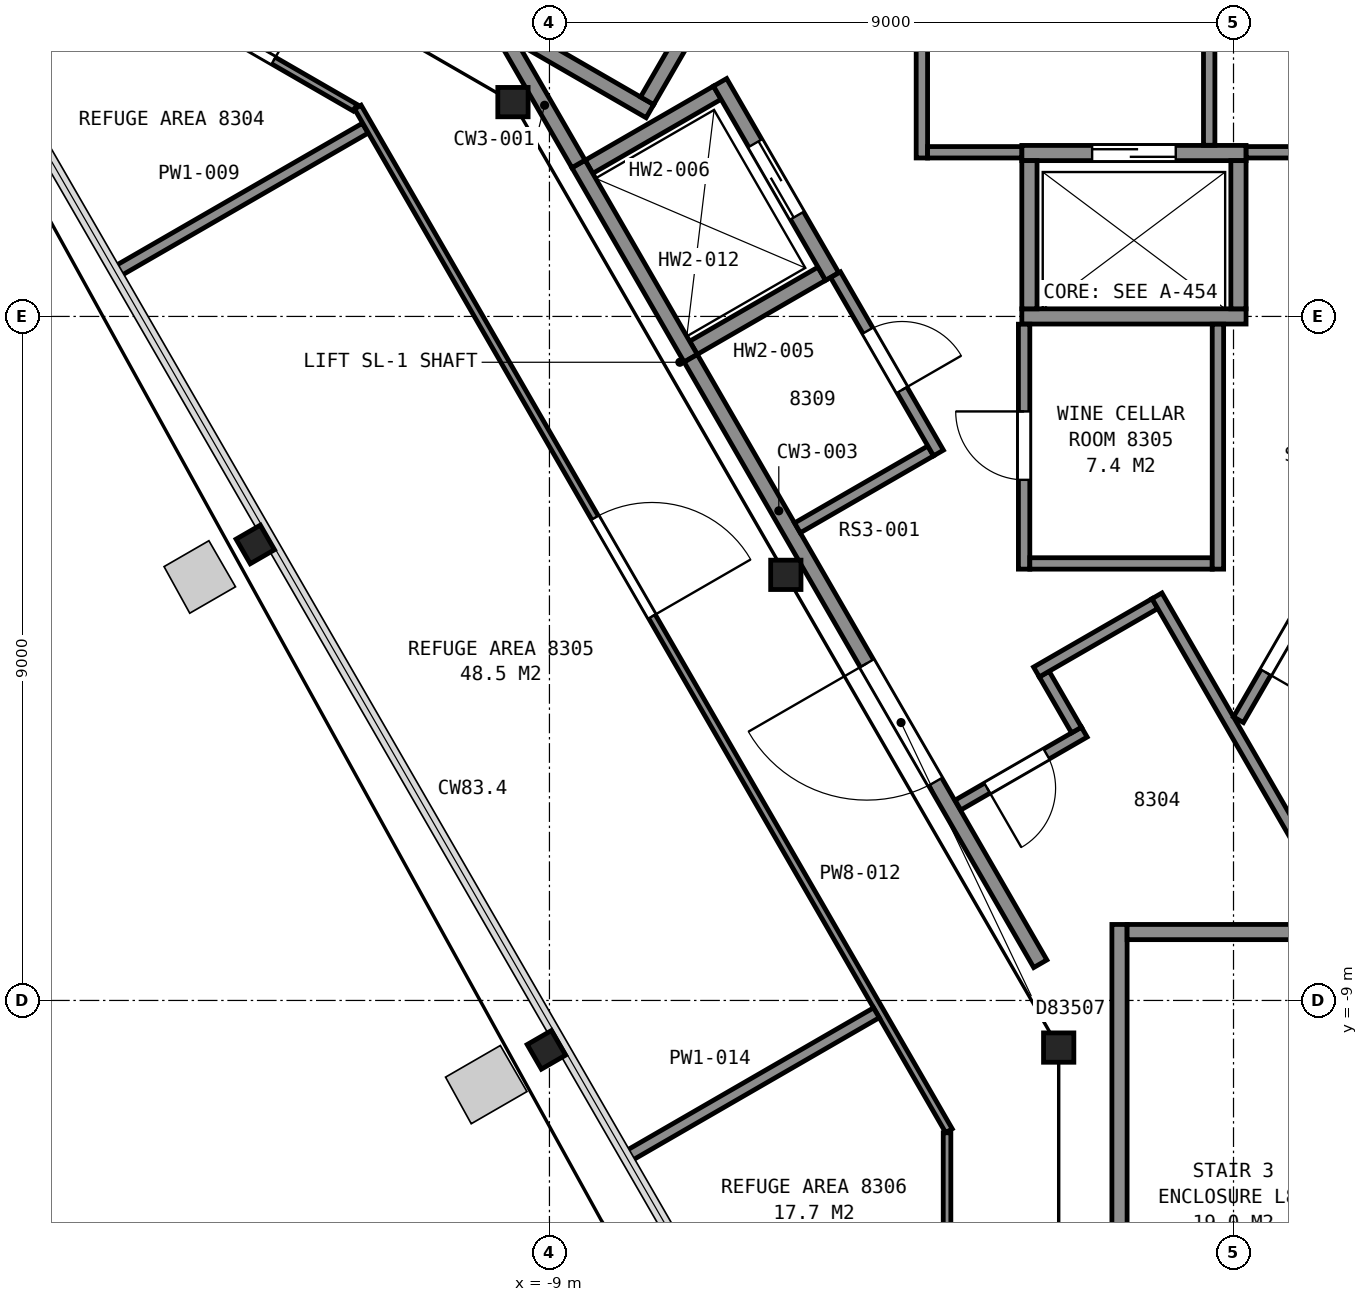
"""IFC4 building model, lengths in metres.
Left out: names, types, materials, properties, quantities, classifications, styles, units other than length and angle.
Written with IfcOpenShell. Run it as: python <this file> out.ifc"""

import sys

from ifc_helpers import new_model, si_unit, direction, frame, frame_2d, origin, origin_2d, place, context, subcontext, project, spatial, rectangle, i_section, extrude, element, fill, save


model = new_model("IFC4")
c1 = context("Model", 3, precision=1e-05, world=origin(), true_north=direction((0.0, 1.0)))
c2 = subcontext(c1, "Body", "Model", "MODEL_VIEW")
j1 = project(units=[si_unit("LENGTHUNIT", "METRE"), si_unit("PLANEANGLEUNIT", "RADIAN")], contexts=[c1])
p1 = place(None, origin())
s1 = spatial("IfcSite", under=j1, at=p1, CompositionType="ELEMENT")
p2 = place(p1, origin())
s2 = spatial("IfcBuilding", under=s1, at=p2, CompositionType="ELEMENT")
p3 = place(p2, frame((0.0, 0.0, 329.4)))
s3 = spatial("IfcBuildingStorey", under=s2, at=p3, CompositionType="ELEMENT", Elevation=329.4)
p4 = place(p3, frame((-12.87, -3.0, 0.0), z_axis=(0.0, 0.0, 1.0), x_axis=(-0.5, 0.866025403784, 0.0)))
e1 = element("IfcColumn", 1, at=p4, inside=s3, PredefinedType="COLUMN", context=c2, shape_type="SweptSolid", body=[
    extrude(i_section(OverallWidth=0.373, OverallDepth=0.368, WebThickness=0.015, FlangeThickness=0.024, FilletRadius=0.015, at=origin_2d()), origin(), (0.0, 0.0, 1.0), 4.37),
])
p5 = place(p3, frame((-9.04, -9.65, 0.0), z_axis=(0.0, 0.0, 1.0), x_axis=(-0.5, 0.866025403784, 0.0)))
e2 = element("IfcColumn", 2, at=p5, inside=s3, PredefinedType="COLUMN", context=c2, shape_type="SweptSolid", body=[
    extrude(i_section(OverallWidth=0.373, OverallDepth=0.368, WebThickness=0.015, FlangeThickness=0.024, FilletRadius=0.015, at=origin_2d()), origin(), (0.0, 0.0, 1.0), 4.59),
])
for number, where, z_axis, x_axis in (
    (3, (-9.48, 2.82, 0.0), (0.0, 0.0, 1.0), (1.0, 0.0, 0.0)),
    (4, (-5.89, -3.4, 0.0), (0.0, 0.0, 1.0), (1.0, 0.0, 0.0)),
    (5, (-2.3, -9.62, 0.0), (0.0, 0.0, 1.0), (1.0, 0.0, 0.0)),
):
    element("IfcColumn", number, at=place(p3, frame(where, z_axis=z_axis, x_axis=x_axis)), inside=s3, PredefinedType="COLUMN", context=c2, shape_type="SweptSolid", body=[
        extrude(i_section(OverallWidth=0.399, OverallDepth=0.386, WebThickness=0.021, FlangeThickness=0.033, FilletRadius=0.015, at=origin_2d()), origin(), (0.0, 0.0, 1.0), 4.2),
    ])
p6 = place(p3, frame((-7.678, 2.701, 0.0), z_axis=(0.0, 0.0, 1.0), x_axis=(-0.866018442252, 0.500012057535, 0.0)))
e6 = element("IfcWall", 6, at=p6, inside=s3, PredefinedType="PARTITIONING", context=c2, shape_type="SweptSolid", body=[
    extrude(rectangle(XDim=7.2, YDim=0.2, at=frame_2d((3.6, 0.0))), origin(), (0.0, 0.0, 1.0), 4.2),
])
p7 = place(p3, frame((-6.315, 5.262, 0.0), z_axis=(0.0, 0.0, 1.0), x_axis=(-0.500049511043, -0.865996816683, 0.0)))
e7 = element("IfcWall", 7, at=p7, inside=s3, PredefinedType="PARTITIONING", context=c2, shape_type="SweptSolid", body=[
    extrude(rectangle(XDim=2.8, YDim=0.2, at=frame_2d((1.4, 0.0))), origin(), (0.0, 0.0, 1.0), 4.2),
])
p8 = place(p3, frame((-1.5, -8.0, 0.0), z_axis=(0.0, 0.0, 1.0), x_axis=(0.0, -1.0, 0.0)))
e8 = element("IfcWall", 8, at=p8, inside=s3, PredefinedType="PARTITIONING", context=c2, shape_type="SweptSolid", body=[
    extrude(rectangle(XDim=7.2, YDim=0.2, at=frame_2d((3.6, 0.0))), origin(), (0.0, 0.0, 1.0), 4.2),
])
p9 = place(p3, frame((-1.4, -8.1, 0.0), z_axis=(0.0, 0.0, 1.0), x_axis=(1.0, 0.0, 0.0)))
e9 = element("IfcWall", 9, at=p9, inside=s3, PredefinedType="PARTITIONING", context=c2, shape_type="SweptSolid", body=[
    extrude(rectangle(XDim=2.8, YDim=0.2, at=frame_2d((1.4, 0.0))), origin(), (0.0, 0.0, 1.0), 4.2),
])
p10 = place(p3, frame((-2.785, 0.0, 0.0), z_axis=(0.0, 0.0, 1.0), x_axis=(1.0, 0.0, 0.0)))
e10 = element("IfcWall", 10, at=p10, inside=s3, PredefinedType="PARTITIONING", context=c2, shape_type="SweptSolid", body=[
    extrude(rectangle(XDim=2.95, YDim=0.2, at=frame_2d((1.475, 0.0))), origin(), (0.0, 0.0, 1.0), 4.2),
])
p11 = place(p3, frame((-2.785, 2.15, 0.0), z_axis=(0.0, 0.0, 1.0), x_axis=(1.0, 0.0, 0.0)))
e11 = element("IfcWall", 11, at=p11, inside=s3, PredefinedType="PARTITIONING", context=c2, shape_type="SweptSolid", body=[
    extrude(rectangle(XDim=2.95, YDim=0.2, at=frame_2d((1.475, 0.0))), origin(), (0.0, 0.0, 1.0), 4.2),
])
p12 = place(p11, frame((0.925, 0.0, 0.0)))
e12 = element("IfcOpeningElement", 12, at=p12, cuts=e11, PredefinedType="OPENING", context=c2, shape_type="SweptSolid", body=[
    extrude(rectangle(XDim=1.1, YDim=2.1, at=frame_2d((0.55, 1.05))), frame((0.0, 0.11, 0.0), z_axis=(0.0, -1.0, 0.0), x_axis=(1.0, 0.0, 0.0)), (0.0, 0.0, 1.0), 0.22),
])
for number, where, z_axis, x_axis in (
    (13, (-7.105, -0.413, 0.0), (0.0, 0.0, 1.0), (0.866, 0.5, 0.0)),
    (14, (-8.48, 1.969, 0.0), (0.0, 0.0, 1.0), (0.866, 0.5, 0.0)),
    (15, (0.065, 0.1, 0.0), (0.0, 0.0, 1.0), (0.0, 1.0, 0.0)),
    (16, (-2.685, 0.1, 0.0), (0.0, 0.0, 1.0), (0.0, 1.0, 0.0)),
):
    element("IfcWall", number, at=place(p3, frame(where, z_axis=z_axis, x_axis=x_axis)), inside=s3, PredefinedType="PARTITIONING", context=c2, shape_type="SweptSolid", body=[
        extrude(rectangle(XDim=1.95, YDim=0.2, at=frame_2d((0.975, 0.0))), origin(), (0.0, 0.0, 1.0), 4.2),
    ])
p13 = place(p3, frame((-5.28, 0.525, 0.0), z_axis=(0.0, 0.0, 1.0), x_axis=(-0.500037662692, 0.866003658127, 0.0)))
e17 = element("IfcWall", 17, at=p13, inside=s3, PredefinedType="PARTITIONING", context=c2, shape_type="SweptSolid", body=[
    extrude(rectangle(XDim=2.95, YDim=0.2, at=frame_2d((1.475, 0.0))), origin(), (0.0, 0.0, 1.0), 4.2),
])
p14 = place(p13, frame((0.925, 0.0, 0.0)))
e18 = element("IfcOpeningElement", 18, at=p14, cuts=e17, PredefinedType="OPENING", context=c2, shape_type="SweptSolid", body=[
    extrude(rectangle(XDim=1.1, YDim=2.1, at=frame_2d((0.55, 1.05))), frame((0.0, 0.11, 0.0), z_axis=(0.0, -1.0, 0.0), x_axis=(1.0, 0.0, 0.0)), (0.0, 0.0, 1.0), 0.22),
])
p15 = place(p3, frame((-7.142, -0.55, 0.0), z_axis=(0.0, 0.0, 1.0), x_axis=(-0.49997559174, 0.866039495442, 0.0)))
e19 = element("IfcWall", 19, at=p15, inside=s3, PredefinedType="PARTITIONING", context=c2, shape_type="SweptSolid", body=[
    extrude(rectangle(XDim=2.95, YDim=0.2, at=frame_2d((1.475, 0.0))), origin(), (0.0, 0.0, 1.0), 4.2),
])
p16 = place(p3, frame((-9.509, 3.551, 0.0), z_axis=(0.0, 0.0, 1.0), x_axis=(0.499999136801, -0.866025902152, 0.0)))
e20 = element("IfcWall", 20, at=p16, inside=s3, PredefinedType="PARTITIONING", context=c2, shape_type="SweptSolid", body=[
    extrude(rectangle(XDim=1.782, YDim=0.2, at=frame_2d((0.891, 0.0))), origin(), (0.0, 0.0, 1.0), 3.9),
])
p17 = place(p3, frame((-7.141, -0.551, 0.0), z_axis=(0.0, 0.0, 1.0), x_axis=(0.499992795234, -0.866029563418, 0.0)))
e21 = element("IfcWall", 21, at=p17, inside=s3, PredefinedType="PARTITIONING", context=c2, shape_type="SweptSolid", body=[
    extrude(rectangle(XDim=9.198, YDim=0.2, at=frame_2d((4.599, 0.0))), origin(), (0.0, 0.0, 1.0), 3.9),
])
p18 = place(p17, frame((4.634, 0.0, 0.0)))
e22 = element("IfcOpeningElement", 22, at=p18, cuts=e21, PredefinedType="OPENING", context=c2, shape_type="SweptSolid", body=[
    extrude(rectangle(XDim=1.8, YDim=2.1, at=frame_2d((0.9, 1.05))), frame((0.0, 0.11, 0.0), z_axis=(0.0, -1.0, 0.0), x_axis=(1.0, 0.0, 0.0)), (0.0, 0.0, 1.0), 0.22),
])
p19 = place(p3, frame((-5.737, -2.782, 0.0), z_axis=(0.0, 0.0, 1.0), x_axis=(0.866000843773, 0.500042536776, 0.0)))
e23 = element("IfcWall", 23, at=p19, inside=s3, PredefinedType="PARTITIONING", context=c2, shape_type="SweptSolid", body=[
    extrude(rectangle(XDim=2.025, YDim=0.15, at=frame_2d((1.012, 0.0))), origin(), (0.0, 0.0, 1.0), 3.9),
])
p20 = place(p3, frame((-3.882, -1.797, 0.0), z_axis=(0.0, 0.0, 1.0), x_axis=(-0.500016307898, 0.86601598821, 0.0)))
e24 = element("IfcWall", 24, at=p20, inside=s3, PredefinedType="PARTITIONING", context=c2, shape_type="SweptSolid", body=[
    extrude(rectangle(XDim=2.709, YDim=0.15, at=frame_2d((1.354, 0.0))), origin(), (0.0, 0.0, 1.0), 3.9),
])
p21 = place(p20, frame((0.959, 0.0, 0.0)))
e25 = element("IfcOpeningElement", 25, at=p21, cuts=e24, PredefinedType="OPENING", context=c2, shape_type="SweptSolid", body=[
    extrude(rectangle(XDim=0.9, YDim=2.1, at=frame_2d((0.45, 1.05))), frame((0.0, 0.085, 0.0), z_axis=(0.0, -1.0, 0.0), x_axis=(1.0, 0.0, 0.0)), (0.0, 0.0, 1.0), 0.17),
])
p22 = place(p3, frame((-4.1, 2.085, 0.0), z_axis=(0.0, 0.0, 1.0), x_axis=(0.0, 1.0, 0.0)))
e26 = element("IfcWall", 26, at=p22, inside=s3, PredefinedType="PARTITIONING", context=c2, shape_type="SweptSolid", body=[
    extrude(rectangle(XDim=4.23, YDim=0.15, at=frame_2d((2.115, 0.0))), origin(), (0.0, 0.0, 1.0), 3.9),
])
p23 = place(p22, frame((1.625, 0.0, 0.0)))
e27 = element("IfcOpeningElement", 27, at=p23, cuts=e26, PredefinedType="OPENING", context=c2, shape_type="SweptSolid", body=[
    extrude(rectangle(XDim=1.0, YDim=2.1, at=frame_2d((0.5, 1.05))), frame((0.0, 0.085, 0.0), z_axis=(0.0, -1.0, 0.0), x_axis=(1.0, 0.0, 0.0)), (0.0, 0.0, 1.0), 0.17),
])
p24 = place(p3, frame((-4.025, 2.16, 0.0), z_axis=(0.0, 0.0, 1.0), x_axis=(1.0, 0.0, 0.0)))
e28 = element("IfcWall", 28, at=p24, inside=s3, PredefinedType="PARTITIONING", context=c2, shape_type="SweptSolid", body=[
    extrude(rectangle(XDim=1.238, YDim=0.15, at=frame_2d((0.619, 0.0))), origin(), (0.0, 0.0, 1.0), 3.9),
])
p25 = place(p3, frame((-1.963, -5.469, 0.0), z_axis=(0.0, 0.0, 1.0), x_axis=(-0.866043720474, -0.49996827322, 0.0)))
e29 = element("IfcWall", 29, at=p25, inside=s3, PredefinedType="PARTITIONING", context=c2, shape_type="SweptSolid", body=[
    extrude(rectangle(XDim=1.92, YDim=0.15, at=frame_2d((0.96, 0.0))), origin(), (0.0, 0.0, 1.0), 3.9),
])
p26 = place(p25, frame((0.575, 0.0, 0.0)))
e30 = element("IfcOpeningElement", 30, at=p26, cuts=e29, PredefinedType="OPENING", context=c2, shape_type="SweptSolid", body=[
    extrude(rectangle(XDim=0.9, YDim=2.1, at=frame_2d((0.45, 1.05))), frame((0.0, 0.085, 0.0), z_axis=(0.0, -1.0, 0.0), x_axis=(1.0, 0.0, 0.0)), (0.0, 0.0, 1.0), 0.17),
])
p27 = place(p3, frame((-2.755, -0.102, 0.0), z_axis=(0.0, 0.0, 1.0), x_axis=(0.0, -1.0, 0.0)))
e31 = element("IfcWall", 31, at=p27, inside=s3, PredefinedType="PARTITIONING", context=c2, shape_type="SweptSolid", body=[
    extrude(rectangle(XDim=3.223, YDim=0.15, at=frame_2d((1.611, 0.0))), origin(), (0.0, 0.0, 1.0), 3.9),
])
p28 = place(p27, frame((1.148, 0.0, 0.0)))
e32 = element("IfcOpeningElement", 32, at=p28, cuts=e31, PredefinedType="OPENING", context=c2, shape_type="SweptSolid", body=[
    extrude(rectangle(XDim=0.9, YDim=2.1, at=frame_2d((0.45, 1.05))), frame((0.0, 0.085, 0.0), z_axis=(0.0, -1.0, 0.0), x_axis=(1.0, 0.0, 0.0)), (0.0, 0.0, 1.0), 0.17),
])
p29 = place(p3, frame((-2.68, -3.25, 0.0), z_axis=(0.0, 0.0, 1.0), x_axis=(1.0, 0.0, 0.0)))
e33 = element("IfcWall", 33, at=p29, inside=s3, PredefinedType="PARTITIONING", context=c2, shape_type="SweptSolid", body=[
    extrude(rectangle(XDim=2.4, YDim=0.15, at=frame_2d((1.2, 0.0))), origin(), (0.0, 0.0, 1.0), 3.9),
])
p30 = place(p3, frame((-2.49, -4.706, 0.0), z_axis=(0.0, 0.0, 1.0), x_axis=(0.500062241894, -0.865989465428, 0.0)))
e34 = element("IfcWall", 34, at=p30, inside=s3, PredefinedType="PARTITIONING", context=c2, shape_type="SweptSolid", body=[
    extrude(rectangle(XDim=0.85, YDim=0.15, at=frame_2d((0.425, 0.0))), origin(), (0.0, 0.0, 1.0), 3.9),
])
p31 = place(p3, frame((-2.593, -4.678, 0.0), z_axis=(0.0, 0.0, 1.0), x_axis=(0.866081705922, 0.499902469156, 0.0)))
e35 = element("IfcWall", 35, at=p31, inside=s3, PredefinedType="PARTITIONING", context=c2, shape_type="SweptSolid", body=[
    extrude(rectangle(XDim=1.8, YDim=0.15, at=frame_2d((0.9, 0.0))), origin(), (0.0, 0.0, 1.0), 3.9),
])
p32 = place(p3, frame((-1.007, -3.676, 0.0), z_axis=(0.0, 0.0, 1.0), x_axis=(0.500037662692, -0.866003658127, 0.0)))
e36 = element("IfcWall", 36, at=p32, inside=s3, PredefinedType="PARTITIONING", context=c2, shape_type="SweptSolid", body=[
    extrude(rectangle(XDim=4.425, YDim=0.15, at=frame_2d((2.212, 0.0))), origin(), (0.0, 0.0, 1.0), 3.9),
])
p33 = place(p3, frame((-0.32, 2.252, 0.0), z_axis=(0.0, 0.0, 1.0), x_axis=(0.0, 1.0, 0.0)))
e37 = element("IfcWall", 37, at=p33, inside=s3, PredefinedType="PARTITIONING", context=c2, shape_type="SweptSolid", body=[
    extrude(rectangle(XDim=4.063, YDim=0.15, at=frame_2d((2.031, 0.0))), origin(), (0.0, 0.0, 1.0), 3.9),
])
p34 = place(p3, frame((-0.205, -3.325, 0.0), z_axis=(0.0, 0.0, 1.0), x_axis=(0.0, 1.0, 0.0)))
e38 = element("IfcWall", 38, at=p34, inside=s3, PredefinedType="PARTITIONING", context=c2, shape_type="SweptSolid", body=[
    extrude(rectangle(XDim=3.223, YDim=0.15, at=frame_2d((1.611, 0.0))), origin(), (0.0, 0.0, 1.0), 3.9),
])
p35 = place(p3, frame((1.316, -3.139, 0.0), z_axis=(0.0, 0.0, 1.0), x_axis=(-0.500063042646, -0.865989003036, 0.0)))
e39 = element("IfcWall", 39, at=p35, inside=s3, PredefinedType="PARTITIONING", context=c2, shape_type="SweptSolid", body=[
    extrude(rectangle(XDim=2.503, YDim=0.15, at=frame_2d((1.251, 0.0))), origin(), (0.0, 0.0, 1.0), 3.9),
])
p36 = place(p35, frame((0.883, 0.0, 0.0)))
e40 = element("IfcOpeningElement", 40, at=p36, cuts=e39, PredefinedType="OPENING", context=c2, shape_type="SweptSolid", body=[
    extrude(rectangle(XDim=0.9, YDim=2.1, at=frame_2d((0.45, 1.05))), frame((0.0, 0.085, 0.0), z_axis=(0.0, -1.0, 0.0), x_axis=(1.0, 0.0, 0.0)), (0.0, 0.0, 1.0), 0.17),
])
p37 = place(p3, frame((0.167, 2.16, 0.0), z_axis=(0.0, 0.0, 1.0), x_axis=(1.0, 0.0, 0.0)))
e41 = element("IfcWall", 41, at=p37, inside=s3, PredefinedType="PARTITIONING", context=c2, shape_type="SweptSolid", body=[
    extrude(rectangle(XDim=1.356, YDim=0.15, at=frame_2d((0.678, 0.0))), origin(), (0.0, 0.0, 1.0), 3.9),
])
p38 = place(p3, frame((-11.557, 2.746, 0.0), z_axis=(0.0, 0.0, 1.0), x_axis=(-0.866005840187, 0.500033883614, 0.0)))
e42 = element("IfcWall", 42, at=p38, inside=s3, PredefinedType="PARTITIONING", context=c2, shape_type="SweptSolid", body=[
    extrude(rectangle(XDim=4.139, YDim=0.1, at=frame_2d((2.07, 0.0))), origin(), (0.0, 0.0, 1.0), 3.297),
])
p39 = place(p38, frame((1.24, 0.0, 0.0)))
e43 = element("IfcOpeningElement", 43, at=p39, cuts=e42, PredefinedType="OPENING", context=c2, shape_type="SweptSolid", body=[
    extrude(rectangle(XDim=1.5, YDim=2.1, at=frame_2d((0.75, 1.05))), frame((0.0, 0.06, 0.0), z_axis=(0.0, -1.0, 0.0), x_axis=(1.0, 0.0, 0.0)), (0.0, 0.0, 1.0), 0.12),
])
p40 = place(p3, frame((-14.696, 0.588, 0.0), z_axis=(0.0, 0.0, 1.0), x_axis=(0.866115649152, 0.499843657852, 0.0)))
e44 = element("IfcWall", 44, at=p40, inside=s3, PredefinedType="PARTITIONING", context=c2, shape_type="SweptSolid", body=[
    extrude(rectangle(XDim=3.778, YDim=0.15, at=frame_2d((1.889, 0.0))), origin(), (0.0, 0.0, 1.0), 3.297),
])
p41 = place(p3, frame((-3.744, -10.714, 0.0), z_axis=(0.0, 0.0, 1.0), x_axis=(-0.500044034969, 0.86599997869, 0.0)))
e45 = element("IfcWall", 45, at=p41, inside=s3, PredefinedType="PARTITIONING", context=c2, shape_type="SweptSolid", body=[
    extrude(rectangle(XDim=15.553, YDim=0.1, at=frame_2d((7.776, 0.0))), origin(), (0.0, 0.0, 1.0), 3.297),
])
p42 = place(p41, frame((7.814, 0.0, 0.0)))
e46 = element("IfcOpeningElement", 46, at=p42, cuts=e45, PredefinedType="OPENING", context=c2, shape_type="SweptSolid", body=[
    extrude(rectangle(XDim=1.5, YDim=2.1, at=frame_2d((0.75, 1.05))), frame((0.0, 0.06, 0.0), z_axis=(0.0, -1.0, 0.0), x_axis=(1.0, 0.0, 0.0)), (0.0, 0.0, 1.0), 0.12),
])
p43 = place(p3, frame((-7.975, -11.054, 0.0), z_axis=(0.0, 0.0, 1.0), x_axis=(0.865998594852, 0.500046431558, 0.0)))
e47 = element("IfcWall", 47, at=p43, inside=s3, PredefinedType="PARTITIONING", context=c2, shape_type="SweptSolid", body=[
    extrude(rectangle(XDim=3.783, YDim=0.15, at=frame_2d((1.892, 0.0))), origin(), (0.0, 0.0, 1.0), 3.297),
])
p44 = place(p3, frame((-3.769, -18.253, 0.0), z_axis=(0.0, 0.0, 1.0), x_axis=(0.0, 1.0, 0.0)))
e48 = element("IfcWall", 48, at=p44, inside=s3, PredefinedType="PARTITIONING", context=c2, shape_type="SweptSolid", body=[
    extrude(rectangle(XDim=7.512, YDim=0.1, at=frame_2d((3.756, 0.0))), origin(), (0.0, 0.0, 1.0), 3.297),
])
p45 = place(p44, frame((3.184, 0.0, 0.0)))
e49 = element("IfcOpeningElement", 49, at=p45, cuts=e48, PredefinedType="OPENING", context=c2, shape_type="SweptSolid", body=[
    extrude(rectangle(XDim=1.5, YDim=2.1, at=frame_2d((0.75, 1.05))), frame((0.0, 0.06, 0.0), z_axis=(0.0, -1.0, 0.0), x_axis=(1.0, 0.0, 0.0)), (0.0, 0.0, 1.0), 0.12),
])
p46 = place(p12, origin())
e50 = element("IfcDoor", 50, at=p46, inside=s3, OperationType="SLIDING_TO_LEFT", PredefinedType="DOOR", context=c2, shape_type="SweptSolid", body=[
    extrude(rectangle(XDim=1.1, YDim=2.1, at=frame_2d((0.55, 1.05))), frame((0.0, 0.025, 0.0), z_axis=(0.0, -1.0, 0.0), x_axis=(1.0, 0.0, 0.0)), (0.0, 0.0, 1.0), 0.05),
])
fill(e12, e50)
p47 = place(p14, origin())
e51 = element("IfcDoor", 51, at=p47, inside=s3, OperationType="SLIDING_TO_LEFT", PredefinedType="DOOR", context=c2, shape_type="SweptSolid", body=[
    extrude(rectangle(XDim=1.1, YDim=2.1, at=frame_2d((0.55, 1.05))), frame((0.0, 0.025, 0.0), z_axis=(0.0, -1.0, 0.0), x_axis=(1.0, 0.0, 0.0)), (0.0, 0.0, 1.0), 0.05),
])
fill(e18, e51)
p48 = place(p18, origin())
e52 = element("IfcDoor", 52, at=p48, inside=s3, OperationType="DOUBLE_DOOR_SINGLE_SWING", PredefinedType="DOOR", context=c2, shape_type="SweptSolid", body=[
    extrude(rectangle(XDim=1.8, YDim=2.1, at=frame_2d((0.9, 1.05))), frame((0.0, 0.025, 0.0), z_axis=(0.0, -1.0, 0.0), x_axis=(1.0, 0.0, 0.0)), (0.0, 0.0, 1.0), 0.05),
])
fill(e22, e52)
p49 = place(p21, origin())
e53 = element("IfcDoor", 53, at=p49, inside=s3, OperationType="SINGLE_SWING_LEFT", PredefinedType="DOOR", context=c2, shape_type="SweptSolid", body=[
    extrude(rectangle(XDim=0.9, YDim=2.1, at=frame_2d((0.45, 1.05))), frame((0.0, 0.025, 0.0), z_axis=(0.0, -1.0, 0.0), x_axis=(1.0, 0.0, 0.0)), (0.0, 0.0, 1.0), 0.05),
])
fill(e25, e53)
p50 = place(p26, origin())
e54 = element("IfcDoor", 54, at=p50, inside=s3, OperationType="SINGLE_SWING_RIGHT", PredefinedType="DOOR", context=c2, shape_type="SweptSolid", body=[
    extrude(rectangle(XDim=0.9, YDim=2.1, at=frame_2d((0.45, 1.05))), frame((0.0, 0.025, 0.0), z_axis=(0.0, -1.0, 0.0), x_axis=(1.0, 0.0, 0.0)), (0.0, 0.0, 1.0), 0.05),
])
fill(e30, e54)
p51 = place(p28, origin())
e55 = element("IfcDoor", 55, at=p51, inside=s3, OperationType="SINGLE_SWING_LEFT", PredefinedType="DOOR", context=c2, shape_type="SweptSolid", body=[
    extrude(rectangle(XDim=0.9, YDim=2.1, at=frame_2d((0.45, 1.05))), frame((0.0, 0.025, 0.0), z_axis=(0.0, -1.0, 0.0), x_axis=(1.0, 0.0, 0.0)), (0.0, 0.0, 1.0), 0.05),
])
fill(e32, e55)
p52 = place(p36, origin())
e56 = element("IfcDoor", 56, at=p52, inside=s3, OperationType="SINGLE_SWING_RIGHT", PredefinedType="DOOR", context=c2, shape_type="SweptSolid", body=[
    extrude(rectangle(XDim=0.9, YDim=2.1, at=frame_2d((0.45, 1.05))), frame((0.0, 0.025, 0.0), z_axis=(0.0, -1.0, 0.0), x_axis=(1.0, 0.0, 0.0)), (0.0, 0.0, 1.0), 0.05),
])
fill(e40, e56)
p53 = place(p39, origin())
e57 = element("IfcDoor", 57, at=p53, inside=s3, OperationType="DOUBLE_DOOR_SINGLE_SWING", PredefinedType="DOOR", context=c2, shape_type="SweptSolid", body=[
    extrude(rectangle(XDim=1.5, YDim=2.1, at=frame_2d((0.75, 1.05))), frame((0.0, 0.025, 0.0), z_axis=(0.0, -1.0, 0.0), x_axis=(1.0, 0.0, 0.0)), (0.0, 0.0, 1.0), 0.05),
])
fill(e43, e57)
p54 = place(p42, origin())
e58 = element("IfcDoor", 58, at=p54, inside=s3, OperationType="DOUBLE_DOOR_SINGLE_SWING", PredefinedType="DOOR", context=c2, shape_type="SweptSolid", body=[
    extrude(rectangle(XDim=1.5, YDim=2.1, at=frame_2d((0.75, 1.05))), frame((0.0, 0.025, 0.0), z_axis=(0.0, -1.0, 0.0), x_axis=(1.0, 0.0, 0.0)), (0.0, 0.0, 1.0), 0.05),
])
fill(e46, e58)
save(model, sys.argv[1])
